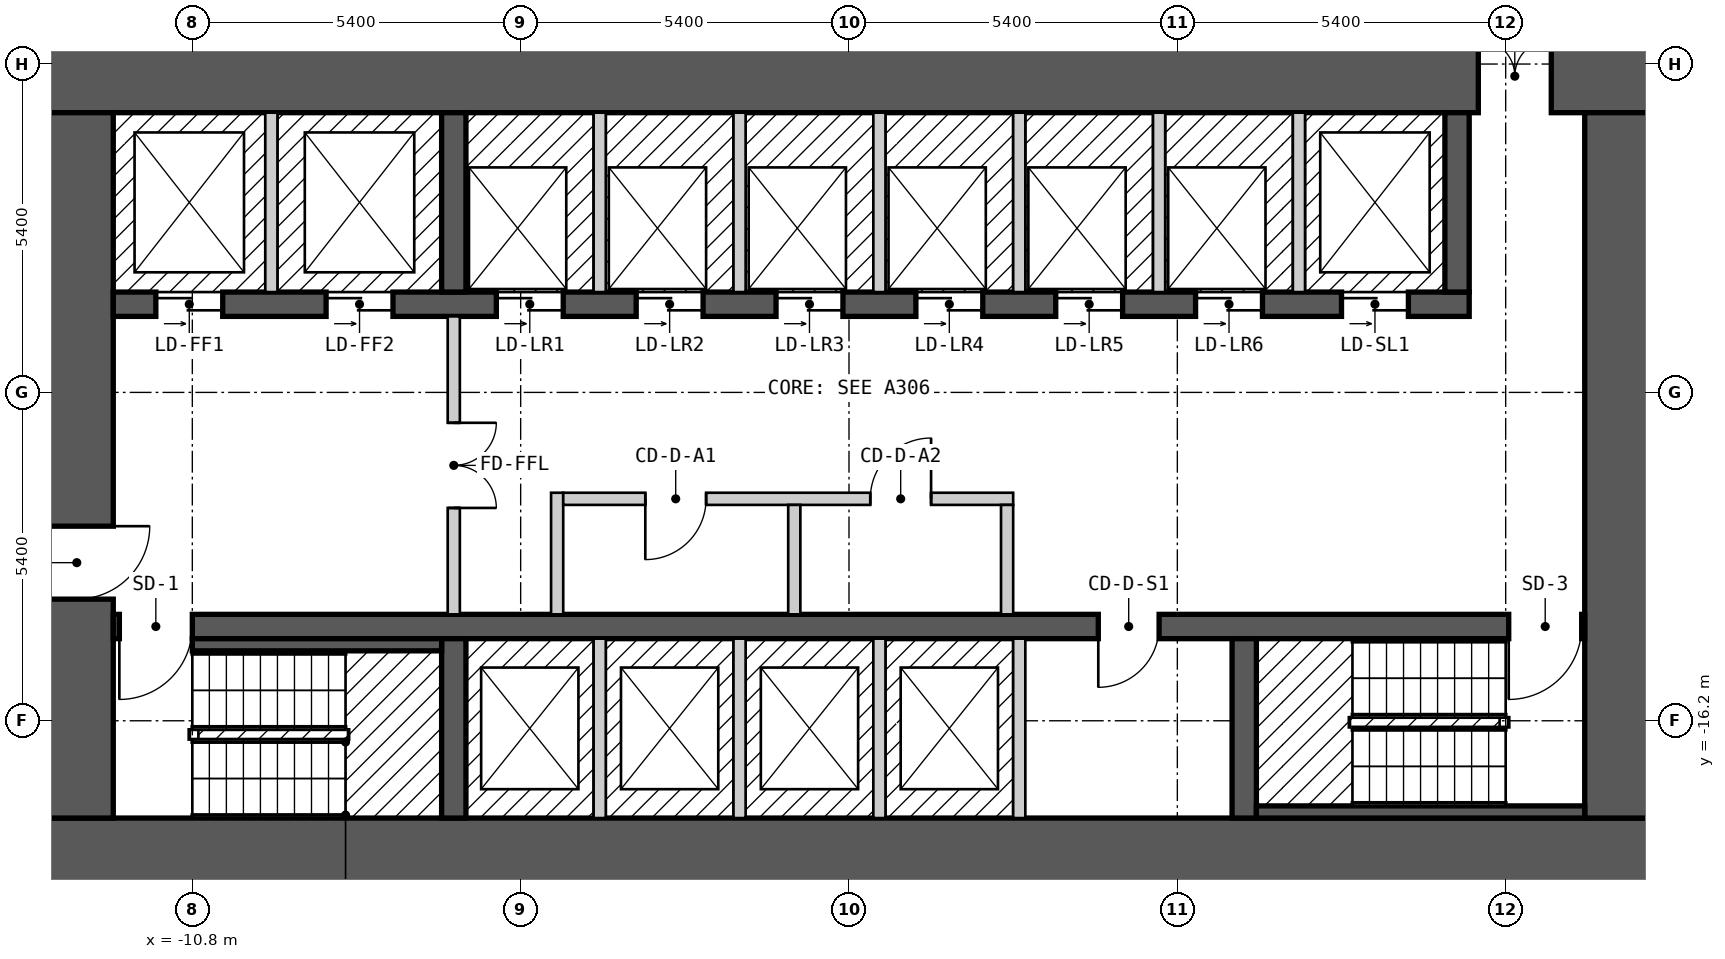
"""IFC4 building model, lengths in metres.
Left out: names, types, materials, properties, quantities, classifications, styles, units other than length and angle.
Written with IfcOpenShell. Run it as: python <this file> out.ifc"""

import sys

from ifc_helpers import new_model, si_unit, direction, frame, frame_2d, origin, place, context, subcontext, project, spatial, rectangle, extrude, element, fill, save


model = new_model("IFC4")
c1 = context("Model", 3, precision=1e-05, world=origin(), true_north=direction((0.0, 1.0)))
c2 = subcontext(c1, "Body", "Model", "MODEL_VIEW")
j1 = project(units=[si_unit("LENGTHUNIT", "METRE"), si_unit("PLANEANGLEUNIT", "RADIAN")], contexts=[c1])
p1 = place(None, origin())
s1 = spatial("IfcSite", under=j1, at=p1, CompositionType="ELEMENT")
p2 = place(p1, origin())
s2 = spatial("IfcBuilding", under=s1, at=p2, CompositionType="ELEMENT")
p3 = place(p2, frame((0.0, 0.0, 12.6)))
s3 = spatial("IfcBuildingStorey", under=s2, at=p3, CompositionType="ELEMENT", Elevation=12.6)
p4 = place(p3, frame((-13.3, -18.4, 0.0), z_axis=(0.0, 0.0, 1.0), x_axis=(1.0, 0.0, 0.0)))
e1 = element("IfcWall", 1, at=p4, inside=s3, PredefinedType="SHEAR", context=c2, shape_type="SweptSolid", body=[
    extrude(rectangle(XDim=26.6, YDim=1.2, at=frame_2d((13.3, 0.0))), origin(), (0.0, 0.0, 1.0), 3.25),
])
p5 = place(p3, frame((-13.3, -5.6, 0.0), z_axis=(0.0, 0.0, 1.0), x_axis=(1.0, 0.0, 0.0)))
e2 = element("IfcWall", 2, at=p5, inside=s3, PredefinedType="SHEAR", context=c2, shape_type="SweptSolid", body=[
    extrude(rectangle(XDim=26.6, YDim=1.2, at=frame_2d((13.3, 0.0))), origin(), (0.0, 0.0, 1.0), 3.25),
])
p6 = place(p5, frame((23.65, 0.0, 0.0)))
e3 = element("IfcOpeningElement", 3, at=p6, cuts=e2, PredefinedType="OPENING", context=c2, shape_type="SweptSolid", body=[
    extrude(rectangle(XDim=1.2, YDim=2.1, at=frame_2d((0.6, 1.05))), frame((0.0, 0.61, 0.0), z_axis=(0.0, -1.0, 0.0), x_axis=(1.0, 0.0, 0.0)), (0.0, 0.0, 1.0), 1.22),
])
p7 = place(p3, frame((-12.7, -17.8, 0.0), z_axis=(0.0, 0.0, 1.0), x_axis=(0.0, 1.0, 0.0)))
e4 = element("IfcWall", 4, at=p7, inside=s3, PredefinedType="SHEAR", context=c2, shape_type="SweptSolid", body=[
    extrude(rectangle(XDim=11.6, YDim=1.2, at=frame_2d((5.8, 0.0))), origin(), (0.0, 0.0, 1.0), 3.25),
])
p8 = place(p7, frame((3.6, 0.0, 0.0)))
e5 = element("IfcOpeningElement", 5, at=p8, cuts=e4, PredefinedType="OPENING", context=c2, shape_type="SweptSolid", body=[
    extrude(rectangle(XDim=1.2, YDim=2.1, at=frame_2d((0.6, 1.05))), frame((0.0, 0.61, 0.0), z_axis=(0.0, -1.0, 0.0), x_axis=(1.0, 0.0, 0.0)), (0.0, 0.0, 1.0), 1.22),
])
p9 = place(p3, frame((12.7, -17.8, 0.0), z_axis=(0.0, 0.0, 1.0), x_axis=(0.0, 1.0, 0.0)))
e6 = element("IfcWall", 6, at=p9, inside=s3, PredefinedType="SHEAR", context=c2, shape_type="SweptSolid", body=[
    extrude(rectangle(XDim=11.6, YDim=1.2, at=frame_2d((5.8, 0.0))), origin(), (0.0, 0.0, 1.0), 3.25),
])
p10 = place(p3, frame((-12.1, -14.65, 0.0), z_axis=(0.0, 0.0, 1.0), x_axis=(1.0, 0.0, 0.0)))
e7 = element("IfcWall", 7, at=p10, inside=s3, PredefinedType="SHEAR", context=c2, shape_type="SweptSolid", body=[
    extrude(rectangle(XDim=24.2, YDim=0.4, at=frame_2d((12.1, 0.0))), origin(), (0.0, 0.0, 1.0), 3.25),
])
p11 = place(p10, frame((1.3, 0.0, 0.0), z_axis=(0.0, 0.0, 1.0), x_axis=(-1.0, 0.0, 0.0)))
e8 = element("IfcOpeningElement", 8, at=p11, cuts=e7, PredefinedType="OPENING", context=c2, shape_type="SweptSolid", body=[
    extrude(rectangle(XDim=1.2, YDim=2.1, at=frame_2d((0.6, 1.05))), frame((0.0, 0.21, 0.0), z_axis=(0.0, -1.0, 0.0), x_axis=(1.0, 0.0, 0.0)), (0.0, 0.0, 1.0), 0.42),
])
p12 = place(p10, frame((24.15, 0.0, 0.0), z_axis=(0.0, 0.0, 1.0), x_axis=(-1.0, 0.0, 0.0)))
e9 = element("IfcOpeningElement", 9, at=p12, cuts=e7, PredefinedType="OPENING", context=c2, shape_type="SweptSolid", body=[
    extrude(rectangle(XDim=1.2, YDim=2.1, at=frame_2d((0.6, 1.05))), frame((0.0, 0.21, 0.0), z_axis=(0.0, -1.0, 0.0), x_axis=(1.0, 0.0, 0.0)), (0.0, 0.0, 1.0), 0.42),
])
p13 = place(p10, frame((17.2, 0.0, 0.0), z_axis=(0.0, 0.0, 1.0), x_axis=(-1.0, 0.0, 0.0)))
e10 = element("IfcOpeningElement", 10, at=p13, cuts=e7, PredefinedType="OPENING", context=c2, shape_type="SweptSolid", body=[
    extrude(rectangle(XDim=1.0, YDim=2.1, at=frame_2d((0.5, 1.05))), frame((0.0, 0.21, 0.0), z_axis=(0.0, -1.0, 0.0), x_axis=(1.0, 0.0, 0.0)), (0.0, 0.0, 1.0), 0.42),
])
p14 = place(p3, frame((-12.1, -9.35, 0.0), z_axis=(0.0, 0.0, 1.0), x_axis=(1.0, 0.0, 0.0)))
e11 = element("IfcWall", 11, at=p14, inside=s3, PredefinedType="SHEAR", context=c2, shape_type="SweptSolid", body=[
    extrude(rectangle(XDim=22.3, YDim=0.4, at=frame_2d((11.15, 0.0))), origin(), (0.0, 0.0, 1.0), 3.25),
])
p15 = place(p14, frame((0.7, 0.0, 0.0)))
e12 = element("IfcOpeningElement", 12, at=p15, cuts=e11, PredefinedType="OPENING", context=c2, shape_type="SweptSolid", body=[
    extrude(rectangle(XDim=1.1, YDim=2.1, at=frame_2d((0.55, 1.05))), frame((0.0, 0.21, 0.0), z_axis=(0.0, -1.0, 0.0), x_axis=(1.0, 0.0, 0.0)), (0.0, 0.0, 1.0), 0.42),
])
p16 = place(p14, frame((3.5, 0.0, 0.0)))
e13 = element("IfcOpeningElement", 13, at=p16, cuts=e11, PredefinedType="OPENING", context=c2, shape_type="SweptSolid", body=[
    extrude(rectangle(XDim=1.1, YDim=2.1, at=frame_2d((0.55, 1.05))), frame((0.0, 0.21, 0.0), z_axis=(0.0, -1.0, 0.0), x_axis=(1.0, 0.0, 0.0)), (0.0, 0.0, 1.0), 0.42),
])
p17 = place(p14, frame((6.3, 0.0, 0.0)))
e14 = element("IfcOpeningElement", 14, at=p17, cuts=e11, PredefinedType="OPENING", context=c2, shape_type="SweptSolid", body=[
    extrude(rectangle(XDim=1.1, YDim=2.1, at=frame_2d((0.55, 1.05))), frame((0.0, 0.21, 0.0), z_axis=(0.0, -1.0, 0.0), x_axis=(1.0, 0.0, 0.0)), (0.0, 0.0, 1.0), 0.42),
])
p18 = place(p14, frame((8.6, 0.0, 0.0)))
e15 = element("IfcOpeningElement", 15, at=p18, cuts=e11, PredefinedType="OPENING", context=c2, shape_type="SweptSolid", body=[
    extrude(rectangle(XDim=1.1, YDim=2.1, at=frame_2d((0.55, 1.05))), frame((0.0, 0.21, 0.0), z_axis=(0.0, -1.0, 0.0), x_axis=(1.0, 0.0, 0.0)), (0.0, 0.0, 1.0), 0.42),
])
p19 = place(p14, frame((10.9, 0.0, 0.0)))
e16 = element("IfcOpeningElement", 16, at=p19, cuts=e11, PredefinedType="OPENING", context=c2, shape_type="SweptSolid", body=[
    extrude(rectangle(XDim=1.1, YDim=2.1, at=frame_2d((0.55, 1.05))), frame((0.0, 0.21, 0.0), z_axis=(0.0, -1.0, 0.0), x_axis=(1.0, 0.0, 0.0)), (0.0, 0.0, 1.0), 0.42),
])
p20 = place(p14, frame((13.2, 0.0, 0.0)))
e17 = element("IfcOpeningElement", 17, at=p20, cuts=e11, PredefinedType="OPENING", context=c2, shape_type="SweptSolid", body=[
    extrude(rectangle(XDim=1.1, YDim=2.1, at=frame_2d((0.55, 1.05))), frame((0.0, 0.21, 0.0), z_axis=(0.0, -1.0, 0.0), x_axis=(1.0, 0.0, 0.0)), (0.0, 0.0, 1.0), 0.42),
])
p21 = place(p14, frame((15.5, 0.0, 0.0)))
e18 = element("IfcOpeningElement", 18, at=p21, cuts=e11, PredefinedType="OPENING", context=c2, shape_type="SweptSolid", body=[
    extrude(rectangle(XDim=1.1, YDim=2.1, at=frame_2d((0.55, 1.05))), frame((0.0, 0.21, 0.0), z_axis=(0.0, -1.0, 0.0), x_axis=(1.0, 0.0, 0.0)), (0.0, 0.0, 1.0), 0.42),
])
p22 = place(p14, frame((17.8, 0.0, 0.0)))
e19 = element("IfcOpeningElement", 19, at=p22, cuts=e11, PredefinedType="OPENING", context=c2, shape_type="SweptSolid", body=[
    extrude(rectangle(XDim=1.1, YDim=2.1, at=frame_2d((0.55, 1.05))), frame((0.0, 0.21, 0.0), z_axis=(0.0, -1.0, 0.0), x_axis=(1.0, 0.0, 0.0)), (0.0, 0.0, 1.0), 0.42),
])
p23 = place(p14, frame((20.2, 0.0, 0.0)))
e20 = element("IfcOpeningElement", 20, at=p23, cuts=e11, PredefinedType="OPENING", context=c2, shape_type="SweptSolid", body=[
    extrude(rectangle(XDim=1.1, YDim=2.1, at=frame_2d((0.55, 1.05))), frame((0.0, 0.21, 0.0), z_axis=(0.0, -1.0, 0.0), x_axis=(1.0, 0.0, 0.0)), (0.0, 0.0, 1.0), 0.42),
])
for number, where, z_axis, x_axis in (
    (21, (-6.5, -17.8, 0.0), (0.0, 0.0, 1.0), (0.0, 1.0, 0.0)),
    (22, (6.5, -17.8, 0.0), (0.0, 0.0, 1.0), (0.0, 1.0, 0.0)),
    (23, (-6.5, -9.15, 0.0), (0.0, 0.0, 1.0), (0.0, 1.0, 0.0)),
    (24, (10.0, -9.15, 0.0), (0.0, 0.0, 1.0), (0.0, 1.0, 0.0)),
):
    element("IfcWall", number, at=place(p3, frame(where, z_axis=z_axis, x_axis=x_axis)), inside=s3, PredefinedType="SHEAR", context=c2, shape_type="SweptSolid", body=[
        extrude(rectangle(XDim=2.95, YDim=0.4, at=frame_2d((1.475, 0.0))), origin(), (0.0, 0.0, 1.0), 3.25),
    ])
p24 = place(p3, frame((-10.8, -14.95, 0.0), z_axis=(0.0, 0.0, 1.0), x_axis=(1.0, 0.0, 0.0)))
e25 = element("IfcWall", 25, at=p24, inside=s3, PredefinedType="SOLIDWALL", context=c2, shape_type="SweptSolid", body=[
    extrude(rectangle(XDim=4.1, YDim=0.2, at=frame_2d((2.05, 0.0))), origin(), (0.0, 0.0, 1.0), 3.25),
])
p25 = place(p3, frame((-9.5, -9.15, 0.0), z_axis=(0.0, 0.0, 1.0), x_axis=(0.0, 1.0, 0.0)))
e26 = element("IfcWall", 26, at=p25, inside=s3, PredefinedType="SOLIDWALL", context=c2, shape_type="SweptSolid", body=[
    extrude(rectangle(XDim=2.95, YDim=0.2, at=frame_2d((1.475, 0.0))), origin(), (0.0, 0.0, 1.0), 3.25),
])
p26 = place(p3, frame((-6.5, -14.45, 0.0), z_axis=(0.0, 0.0, 1.0), x_axis=(0.0, 1.0, 0.0)))
e27 = element("IfcWall", 27, at=p26, inside=s3, PredefinedType="PARTITIONING", context=c2, shape_type="SweptSolid", body=[
    extrude(rectangle(XDim=4.9, YDim=0.2, at=frame_2d((2.45, 0.0))), origin(), (0.0, 0.0, 1.0), 3.25),
])
p27 = place(p26, frame((3.15, 0.0, 0.0), z_axis=(0.0, 0.0, 1.0), x_axis=(-1.0, 0.0, 0.0)))
e28 = element("IfcOpeningElement", 28, at=p27, cuts=e27, PredefinedType="OPENING", context=c2, shape_type="SweptSolid", body=[
    extrude(rectangle(XDim=1.4, YDim=2.1, at=frame_2d((0.7, 1.05))), frame((0.0, 0.11, 0.0), z_axis=(0.0, -1.0, 0.0), x_axis=(1.0, 0.0, 0.0)), (0.0, 0.0, 1.0), 0.22),
])
p28 = place(p3, frame((-4.8, -14.45, 0.0), z_axis=(0.0, 0.0, 1.0), x_axis=(0.0, 1.0, 0.0)))
e29 = element("IfcWall", 29, at=p28, inside=s3, PredefinedType="PARTITIONING", context=c2, shape_type="SweptSolid", body=[
    extrude(rectangle(XDim=2.0, YDim=0.2, at=frame_2d((1.0, 0.0))), origin(), (0.0, 0.0, 1.0), 3.25),
])
p29 = place(p3, frame((-4.7, -12.55, 0.0), z_axis=(0.0, 0.0, 1.0), x_axis=(1.0, 0.0, 0.0)))
e30 = element("IfcWall", 30, at=p29, inside=s3, PredefinedType="PARTITIONING", context=c2, shape_type="SweptSolid", body=[
    extrude(rectangle(XDim=7.4, YDim=0.2, at=frame_2d((3.7, 0.0))), origin(), (0.0, 0.0, 1.0), 3.25),
])
p30 = place(p29, frame((2.35, 0.0, 0.0), z_axis=(0.0, 0.0, 1.0), x_axis=(-1.0, 0.0, 0.0)))
e31 = element("IfcOpeningElement", 31, at=p30, cuts=e30, PredefinedType="OPENING", context=c2, shape_type="SweptSolid", body=[
    extrude(rectangle(XDim=1.0, YDim=2.1, at=frame_2d((0.5, 1.05))), frame((0.0, 0.11, 0.0), z_axis=(0.0, -1.0, 0.0), x_axis=(1.0, 0.0, 0.0)), (0.0, 0.0, 1.0), 0.22),
])
p31 = place(p29, frame((6.05, 0.0, 0.0), z_axis=(0.0, 0.0, 1.0), x_axis=(-1.0, 0.0, 0.0)))
e32 = element("IfcOpeningElement", 32, at=p31, cuts=e30, PredefinedType="OPENING", context=c2, shape_type="SweptSolid", body=[
    extrude(rectangle(XDim=1.0, YDim=2.1, at=frame_2d((0.5, 1.05))), frame((0.0, 0.11, 0.0), z_axis=(0.0, -1.0, 0.0), x_axis=(1.0, 0.0, 0.0)), (0.0, 0.0, 1.0), 0.22),
])
for number, where, z_axis, x_axis in (
    (33, (-4.1, -17.8, 0.0), (0.0, 0.0, 1.0), (0.0, 1.0, 0.0)),
    (34, (-4.1, -9.15, 0.0), (0.0, 0.0, 1.0), (0.0, 1.0, 0.0)),
    (35, (-1.8, -17.8, 0.0), (0.0, 0.0, 1.0), (0.0, 1.0, 0.0)),
    (36, (-1.8, -9.15, 0.0), (0.0, 0.0, 1.0), (0.0, 1.0, 0.0)),
):
    element("IfcWall", number, at=place(p3, frame(where, z_axis=z_axis, x_axis=x_axis)), inside=s3, PredefinedType="SOLIDWALL", context=c2, shape_type="SweptSolid", body=[
        extrude(rectangle(XDim=2.95, YDim=0.2, at=frame_2d((1.475, 0.0))), origin(), (0.0, 0.0, 1.0), 3.25),
    ])
p32 = place(p3, frame((-0.9, -14.45, 0.0), z_axis=(0.0, 0.0, 1.0), x_axis=(0.0, 1.0, 0.0)))
e37 = element("IfcWall", 37, at=p32, inside=s3, PredefinedType="PARTITIONING", context=c2, shape_type="SweptSolid", body=[
    extrude(rectangle(XDim=1.8, YDim=0.2, at=frame_2d((0.9, 0.0))), origin(), (0.0, 0.0, 1.0), 3.25),
])
for number, where, z_axis, x_axis in (
    (38, (0.5, -17.8, 0.0), (0.0, 0.0, 1.0), (0.0, 1.0, 0.0)),
    (39, (0.5, -9.15, 0.0), (0.0, 0.0, 1.0), (0.0, 1.0, 0.0)),
):
    element("IfcWall", number, at=place(p3, frame(where, z_axis=z_axis, x_axis=x_axis)), inside=s3, PredefinedType="SOLIDWALL", context=c2, shape_type="SweptSolid", body=[
        extrude(rectangle(XDim=2.95, YDim=0.2, at=frame_2d((1.475, 0.0))), origin(), (0.0, 0.0, 1.0), 3.25),
    ])
p33 = place(p3, frame((2.6, -14.45, 0.0), z_axis=(0.0, 0.0, 1.0), x_axis=(0.0, 1.0, 0.0)))
e40 = element("IfcWall", 40, at=p33, inside=s3, PredefinedType="PARTITIONING", context=c2, shape_type="SweptSolid", body=[
    extrude(rectangle(XDim=1.8, YDim=0.2, at=frame_2d((0.9, 0.0))), origin(), (0.0, 0.0, 1.0), 3.25),
])
for number, where, z_axis, x_axis in (
    (41, (2.8, -17.8, 0.0), (0.0, 0.0, 1.0), (0.0, 1.0, 0.0)),
    (42, (2.8, -9.15, 0.0), (0.0, 0.0, 1.0), (0.0, 1.0, 0.0)),
    (43, (5.1, -9.15, 0.0), (0.0, 0.0, 1.0), (0.0, 1.0, 0.0)),
):
    element("IfcWall", number, at=place(p3, frame(where, z_axis=z_axis, x_axis=x_axis)), inside=s3, PredefinedType="SOLIDWALL", context=c2, shape_type="SweptSolid", body=[
        extrude(rectangle(XDim=2.95, YDim=0.2, at=frame_2d((1.475, 0.0))), origin(), (0.0, 0.0, 1.0), 3.25),
    ])
p34 = place(p3, frame((6.7, -17.7, 0.0), z_axis=(0.0, 0.0, 1.0), x_axis=(1.0, 0.0, 0.0)))
e44 = element("IfcWall", 44, at=p34, inside=s3, PredefinedType="SOLIDWALL", context=c2, shape_type="SweptSolid", body=[
    extrude(rectangle(XDim=5.4, YDim=0.2, at=frame_2d((2.7, 0.0))), origin(), (0.0, 0.0, 1.0), 3.25),
])
p35 = place(p3, frame((7.4, -9.15, 0.0), z_axis=(0.0, 0.0, 1.0), x_axis=(0.0, 1.0, 0.0)))
e45 = element("IfcWall", 45, at=p35, inside=s3, PredefinedType="SOLIDWALL", context=c2, shape_type="SweptSolid", body=[
    extrude(rectangle(XDim=2.95, YDim=0.2, at=frame_2d((1.475, 0.0))), origin(), (0.0, 0.0, 1.0), 3.25),
])
p36 = place(p15, origin())
e46 = element("IfcDoor", 46, at=p36, inside=s3, OperationType="DOUBLE_DOOR_SLIDING", PredefinedType="DOOR", context=c2, shape_type="SweptSolid", body=[
    extrude(rectangle(XDim=1.1, YDim=2.1, at=frame_2d((0.55, 1.05))), frame((0.0, 0.025, 0.0), z_axis=(0.0, -1.0, 0.0), x_axis=(1.0, 0.0, 0.0)), (0.0, 0.0, 1.0), 0.05),
])
fill(e12, e46)
p37 = place(p16, origin())
e47 = element("IfcDoor", 47, at=p37, inside=s3, OperationType="DOUBLE_DOOR_SLIDING", PredefinedType="DOOR", context=c2, shape_type="SweptSolid", body=[
    extrude(rectangle(XDim=1.1, YDim=2.1, at=frame_2d((0.55, 1.05))), frame((0.0, 0.025, 0.0), z_axis=(0.0, -1.0, 0.0), x_axis=(1.0, 0.0, 0.0)), (0.0, 0.0, 1.0), 0.05),
])
fill(e13, e47)
p38 = place(p17, origin())
e48 = element("IfcDoor", 48, at=p38, inside=s3, OperationType="DOUBLE_DOOR_SLIDING", PredefinedType="DOOR", context=c2, shape_type="SweptSolid", body=[
    extrude(rectangle(XDim=1.1, YDim=2.1, at=frame_2d((0.55, 1.05))), frame((0.0, 0.025, 0.0), z_axis=(0.0, -1.0, 0.0), x_axis=(1.0, 0.0, 0.0)), (0.0, 0.0, 1.0), 0.05),
])
fill(e14, e48)
p39 = place(p18, origin())
e49 = element("IfcDoor", 49, at=p39, inside=s3, OperationType="DOUBLE_DOOR_SLIDING", PredefinedType="DOOR", context=c2, shape_type="SweptSolid", body=[
    extrude(rectangle(XDim=1.1, YDim=2.1, at=frame_2d((0.55, 1.05))), frame((0.0, 0.025, 0.0), z_axis=(0.0, -1.0, 0.0), x_axis=(1.0, 0.0, 0.0)), (0.0, 0.0, 1.0), 0.05),
])
fill(e15, e49)
p40 = place(p19, origin())
e50 = element("IfcDoor", 50, at=p40, inside=s3, OperationType="DOUBLE_DOOR_SLIDING", PredefinedType="DOOR", context=c2, shape_type="SweptSolid", body=[
    extrude(rectangle(XDim=1.1, YDim=2.1, at=frame_2d((0.55, 1.05))), frame((0.0, 0.025, 0.0), z_axis=(0.0, -1.0, 0.0), x_axis=(1.0, 0.0, 0.0)), (0.0, 0.0, 1.0), 0.05),
])
fill(e16, e50)
p41 = place(p20, origin())
e51 = element("IfcDoor", 51, at=p41, inside=s3, OperationType="DOUBLE_DOOR_SLIDING", PredefinedType="DOOR", context=c2, shape_type="SweptSolid", body=[
    extrude(rectangle(XDim=1.1, YDim=2.1, at=frame_2d((0.55, 1.05))), frame((0.0, 0.025, 0.0), z_axis=(0.0, -1.0, 0.0), x_axis=(1.0, 0.0, 0.0)), (0.0, 0.0, 1.0), 0.05),
])
fill(e17, e51)
p42 = place(p21, origin())
e52 = element("IfcDoor", 52, at=p42, inside=s3, OperationType="DOUBLE_DOOR_SLIDING", PredefinedType="DOOR", context=c2, shape_type="SweptSolid", body=[
    extrude(rectangle(XDim=1.1, YDim=2.1, at=frame_2d((0.55, 1.05))), frame((0.0, 0.025, 0.0), z_axis=(0.0, -1.0, 0.0), x_axis=(1.0, 0.0, 0.0)), (0.0, 0.0, 1.0), 0.05),
])
fill(e18, e52)
p43 = place(p22, origin())
e53 = element("IfcDoor", 53, at=p43, inside=s3, OperationType="DOUBLE_DOOR_SLIDING", PredefinedType="DOOR", context=c2, shape_type="SweptSolid", body=[
    extrude(rectangle(XDim=1.1, YDim=2.1, at=frame_2d((0.55, 1.05))), frame((0.0, 0.025, 0.0), z_axis=(0.0, -1.0, 0.0), x_axis=(1.0, 0.0, 0.0)), (0.0, 0.0, 1.0), 0.05),
])
fill(e19, e53)
p44 = place(p23, origin())
e54 = element("IfcDoor", 54, at=p44, inside=s3, OperationType="DOUBLE_DOOR_SLIDING", PredefinedType="DOOR", context=c2, shape_type="SweptSolid", body=[
    extrude(rectangle(XDim=1.1, YDim=2.1, at=frame_2d((0.55, 1.05))), frame((0.0, 0.025, 0.0), z_axis=(0.0, -1.0, 0.0), x_axis=(1.0, 0.0, 0.0)), (0.0, 0.0, 1.0), 0.05),
])
fill(e20, e54)
p45 = place(p11, origin())
e55 = element("IfcDoor", 55, at=p45, inside=s3, OperationType="SINGLE_SWING_RIGHT", PredefinedType="DOOR", context=c2, shape_type="SweptSolid", body=[
    extrude(rectangle(XDim=1.2, YDim=2.1, at=frame_2d((0.6, 1.05))), frame((0.0, 0.025, 0.0), z_axis=(0.0, -1.0, 0.0), x_axis=(1.0, 0.0, 0.0)), (0.0, 0.0, 1.0), 0.05),
])
fill(e8, e55)
p46 = place(p12, origin())
e56 = element("IfcDoor", 56, at=p46, inside=s3, OperationType="SINGLE_SWING_RIGHT", PredefinedType="DOOR", context=c2, shape_type="SweptSolid", body=[
    extrude(rectangle(XDim=1.2, YDim=2.1, at=frame_2d((0.6, 1.05))), frame((0.0, 0.025, 0.0), z_axis=(0.0, -1.0, 0.0), x_axis=(1.0, 0.0, 0.0)), (0.0, 0.0, 1.0), 0.05),
])
fill(e9, e56)
p47 = place(p8, origin())
e57 = element("IfcDoor", 57, at=p47, inside=s3, OperationType="SINGLE_SWING_RIGHT", PredefinedType="DOOR", context=c2, shape_type="SweptSolid", body=[
    extrude(rectangle(XDim=1.2, YDim=2.1, at=frame_2d((0.6, 1.05))), frame((0.0, 0.025, 0.0), z_axis=(0.0, -1.0, 0.0), x_axis=(1.0, 0.0, 0.0)), (0.0, 0.0, 1.0), 0.05),
])
fill(e5, e57)
p48 = place(p27, origin())
e58 = element("IfcDoor", 58, at=p48, inside=s3, OperationType="DOUBLE_DOOR_SINGLE_SWING", PredefinedType="DOOR", context=c2, shape_type="SweptSolid", body=[
    extrude(rectangle(XDim=1.4, YDim=2.1, at=frame_2d((0.7, 1.05))), frame((0.0, 0.025, 0.0), z_axis=(0.0, -1.0, 0.0), x_axis=(1.0, 0.0, 0.0)), (0.0, 0.0, 1.0), 0.05),
])
fill(e28, e58)
p49 = place(p6, origin())
e59 = element("IfcDoor", 59, at=p49, inside=s3, OperationType="DOUBLE_DOOR_SINGLE_SWING", PredefinedType="DOOR", context=c2, shape_type="SweptSolid", body=[
    extrude(rectangle(XDim=1.2, YDim=2.1, at=frame_2d((0.6, 1.05))), frame((0.0, 0.025, 0.0), z_axis=(0.0, -1.0, 0.0), x_axis=(1.0, 0.0, 0.0)), (0.0, 0.0, 1.0), 0.05),
])
fill(e3, e59)
p50 = place(p30, origin())
e60 = element("IfcDoor", 60, at=p50, inside=s3, OperationType="SINGLE_SWING_RIGHT", PredefinedType="DOOR", context=c2, shape_type="SweptSolid", body=[
    extrude(rectangle(XDim=1.0, YDim=2.1, at=frame_2d((0.5, 1.05))), frame((0.0, 0.025, 0.0), z_axis=(0.0, -1.0, 0.0), x_axis=(1.0, 0.0, 0.0)), (0.0, 0.0, 1.0), 0.05),
])
fill(e31, e60)
p51 = place(p31, origin())
e61 = element("IfcDoor", 61, at=p51, inside=s3, OperationType="SINGLE_SWING_LEFT", PredefinedType="DOOR", context=c2, shape_type="SweptSolid", body=[
    extrude(rectangle(XDim=1.0, YDim=2.1, at=frame_2d((0.5, 1.05))), frame((0.0, 0.025, 0.0), z_axis=(0.0, -1.0, 0.0), x_axis=(1.0, 0.0, 0.0)), (0.0, 0.0, 1.0), 0.05),
])
fill(e32, e61)
p52 = place(p13, origin())
e62 = element("IfcDoor", 62, at=p52, inside=s3, OperationType="SINGLE_SWING_RIGHT", PredefinedType="DOOR", context=c2, shape_type="SweptSolid", body=[
    extrude(rectangle(XDim=1.0, YDim=2.1, at=frame_2d((0.5, 1.05))), frame((0.0, 0.025, 0.0), z_axis=(0.0, -1.0, 0.0), x_axis=(1.0, 0.0, 0.0)), (0.0, 0.0, 1.0), 0.05),
])
fill(e10, e62)
save(model, sys.argv[1])
